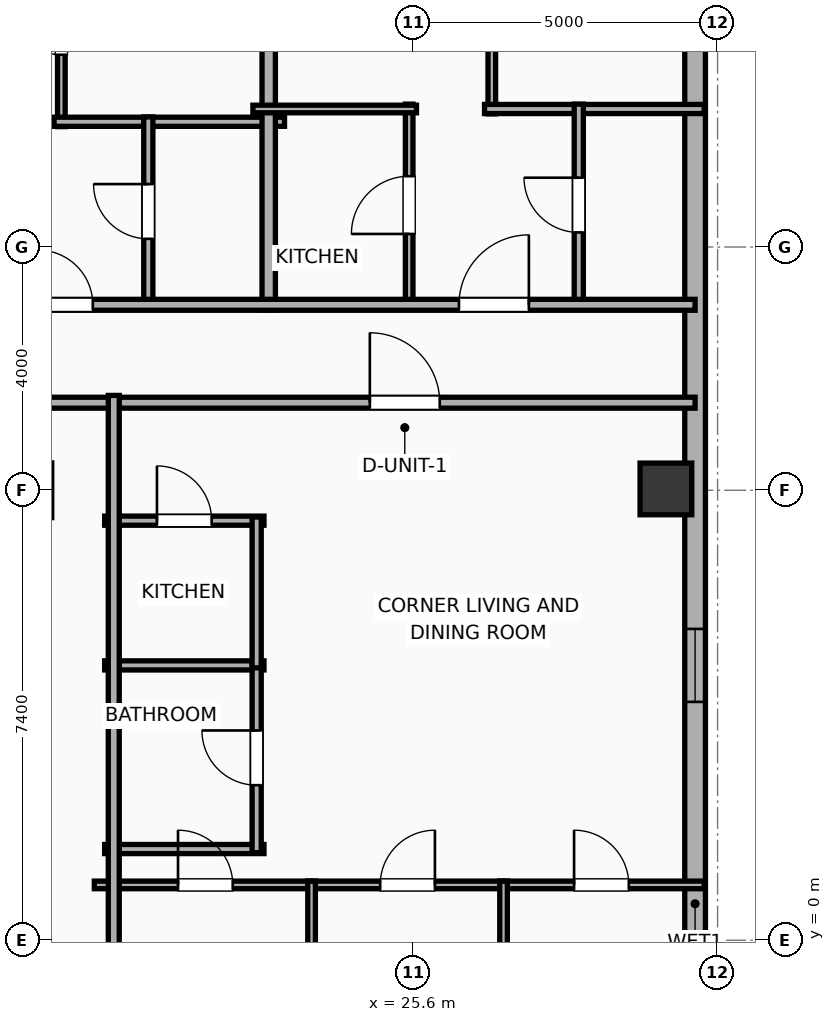
"""IFC4 building model, lengths in metres.
Left out: names, types, materials, properties, quantities, classifications, styles, units other than length and angle.
Written with IfcOpenShell. Run it as: python <this file> out.ifc"""

import sys

from ifc_helpers import new_model, si_unit, direction, frame, frame_2d, origin, origin_2d, place, context, subcontext, project, spatial, rectangle, hollow_rectangle, extrude, element, fill, save


model = new_model("IFC4")
c1 = context("Model", 3, precision=1e-05, world=origin(), true_north=direction((0.0, 1.0)))
c2 = subcontext(c1, "Body", "Model", "MODEL_VIEW")
j1 = project(units=[si_unit("LENGTHUNIT", "METRE"), si_unit("PLANEANGLEUNIT", "RADIAN")], contexts=[c1])
p1 = place(None, origin())
s1 = spatial("IfcSite", under=j1, at=p1, CompositionType="ELEMENT")
p2 = place(p1, origin())
s2 = spatial("IfcBuilding", under=s1, at=p2, CompositionType="ELEMENT")
p3 = place(p2, frame((0.0, 0.0, 204.1)))
s3 = spatial("IfcBuildingStorey", under=s2, at=p3, CompositionType="ELEMENT", Elevation=204.1)
p4 = place(p3, frame((29.75, 7.422, 0.0), z_axis=(0.0, 0.0, 1.0), x_axis=(1.0, 0.0, 0.0)))
e1 = element("IfcColumn", 1, at=p4, inside=s3, PredefinedType="COLUMN", context=c2, shape_type="SweptSolid", body=[
    extrude(hollow_rectangle(XDim=0.85, YDim=0.85, WallThickness=0.028, at=origin_2d()), origin(), (0.0, 0.0, 1.0), 3.9),
])
p5 = place(p3, frame((30.23, 16.583, 0.0), z_axis=(0.0, 0.0, 1.0), x_axis=(0.0, -1.0, 0.0)))
e2 = element("IfcWall", 2, at=p5, inside=s3, PredefinedType="ELEMENTEDWALL", context=c2, shape_type="SweptSolid", body=[
    extrude(rectangle(XDim=31.967, YDim=0.34, at=frame_2d((15.983, 0.0))), origin(), (0.0, 0.0, 1.0), 3.65),
])
p6 = place(p5, frame((29.924, 0.0, 0.75)))
e3 = element("IfcOpeningElement", 3, at=p6, cuts=e2, PredefinedType="OPENING", context=c2, shape_type="SweptSolid", body=[
    extrude(rectangle(XDim=1.2, YDim=2.05, at=frame_2d((0.6, 1.025))), frame((0.0, 0.18, 0.0), z_axis=(0.0, -1.0, 0.0), x_axis=(1.0, 0.0, 0.0)), (0.0, 0.0, 1.0), 0.36),
])
p7 = place(p5, frame((11.463, 0.0, 0.75)))
e4 = element("IfcOpeningElement", 4, at=p7, cuts=e2, PredefinedType="OPENING", context=c2, shape_type="SweptSolid", body=[
    extrude(rectangle(XDim=1.2, YDim=2.05, at=frame_2d((0.6, 1.025))), frame((0.0, 0.18, 0.0), z_axis=(0.0, -1.0, 0.0), x_axis=(1.0, 0.0, 0.0)), (0.0, 0.0, 1.0), 0.36),
])
p8 = place(p5, frame((20.363, 0.0, 0.75)))
e5 = element("IfcOpeningElement", 5, at=p8, cuts=e2, PredefinedType="OPENING", context=c2, shape_type="SweptSolid", body=[
    extrude(rectangle(XDim=1.2, YDim=2.05, at=frame_2d((0.6, 1.025))), frame((0.0, 0.18, 0.0), z_axis=(0.0, -1.0, 0.0), x_axis=(1.0, 0.0, 0.0)), (0.0, 0.0, 1.0), 0.36),
])
p9 = place(p3, frame((9.88, 8.84, 0.0), z_axis=(0.0, 0.0, 1.0), x_axis=(1.0, 0.0, 0.0)))
e6 = element("IfcWall", 6, at=p9, inside=s3, PredefinedType="PARTITIONING", context=c2, shape_type="SweptSolid", body=[
    extrude(rectangle(XDim=20.35, YDim=0.18, at=frame_2d((10.175, 0.0))), origin(), (0.0, 0.0, 1.0), 3.65),
])
p10 = place(p9, frame((15.001, 0.0, 0.0)))
e7 = element("IfcOpeningElement", 7, at=p10, cuts=e6, PredefinedType="OPENING", context=c2, shape_type="SweptSolid", body=[
    extrude(rectangle(XDim=1.15, YDim=2.05, at=frame_2d((0.575, 1.025))), frame((0.0, 0.1, 0.0), z_axis=(0.0, -1.0, 0.0), x_axis=(1.0, 0.0, 0.0)), (0.0, 0.0, 1.0), 0.2),
])
p11 = place(p3, frame((19.808, 13.38, 0.0), z_axis=(0.0, 0.0, 1.0), x_axis=(0.0, 1.0, 0.0)))
e8 = element("IfcWall", 8, at=p11, inside=s3, PredefinedType="PARTITIONING", context=c2, shape_type="SweptSolid", body=[
    extrude(rectangle(XDim=6.8, YDim=0.125, at=frame_2d((3.4, 0.0))), origin(), (0.0, 0.0, 1.0), 3.65),
])
p12 = place(p11, frame((1.182, 0.0, 0.0)))
e9 = element("IfcOpeningElement", 9, at=p12, cuts=e8, PredefinedType="OPENING", context=c2, shape_type="SweptSolid", body=[
    extrude(rectangle(XDim=0.9, YDim=2.05, at=frame_2d((0.45, 1.025))), frame((0.0, 0.073, 0.0), z_axis=(0.0, -1.0, 0.0), x_axis=(1.0, 0.0, 0.0)), (0.0, 0.0, 1.0), 0.145),
])
p13 = place(p3, frame((19.688, 13.46, 0.0), z_axis=(0.0, 0.0, 1.0), x_axis=(1.0, 0.0, 0.0)))
e10 = element("IfcWall", 10, at=p13, inside=s3, PredefinedType="PLUMBINGWALL", context=c2, shape_type="SweptSolid", body=[
    extrude(rectangle(XDim=3.79, YDim=0.15, at=frame_2d((1.895, 0.0))), origin(), (0.0, 0.0, 1.0), 3.65),
])
p14 = place(p3, frame((21.238, 10.43, 0.0), z_axis=(0.0, 0.0, 1.0), x_axis=(0.0, 1.0, 0.0)))
e11 = element("IfcWall", 11, at=p14, inside=s3, PredefinedType="PLUMBINGWALL", context=c2, shape_type="SweptSolid", body=[
    extrude(rectangle(XDim=3.11, YDim=0.15, at=frame_2d((1.555, 0.0))), origin(), (0.0, 0.0, 1.0), 3.65),
])
p15 = place(p14, frame((1.105, 0.0, 0.0)))
e12 = element("IfcOpeningElement", 12, at=p15, cuts=e11, PredefinedType="OPENING", context=c2, shape_type="SweptSolid", body=[
    extrude(rectangle(XDim=0.9, YDim=2.05, at=frame_2d((0.45, 1.025))), frame((0.0, 0.085, 0.0), z_axis=(0.0, -1.0, 0.0), x_axis=(1.0, 0.0, 0.0)), (0.0, 0.0, 1.0), 0.17),
])
p16 = place(p3, frame((23.218, 10.37, 0.0), z_axis=(0.0, 0.0, 1.0), x_axis=(0.0, 1.0, 0.0)))
e13 = element("IfcWall", 13, at=p16, inside=s3, PredefinedType="PARTITIONING", context=c2, shape_type="SweptSolid", body=[
    extrude(rectangle(XDim=9.66, YDim=0.22, at=frame_2d((4.83, 0.0))), origin(), (0.0, 0.0, 1.0), 3.65),
])
p17 = place(p3, frame((26.887, 13.59, 0.0), z_axis=(0.0, 0.0, 1.0), x_axis=(0.0, 1.0, 0.0)))
e14 = element("IfcWall", 14, at=p17, inside=s3, PredefinedType="PARTITIONING", context=c2, shape_type="SweptSolid", body=[
    extrude(rectangle(XDim=6.572, YDim=0.125, at=frame_2d((3.286, 0.0))), origin(), (0.0, 0.0, 1.0), 3.65),
])
p18 = place(p17, frame((1.127, 0.0, 0.0)))
e15 = element("IfcOpeningElement", 15, at=p18, cuts=e14, PredefinedType="OPENING", context=c2, shape_type="SweptSolid", body=[
    extrude(rectangle(XDim=0.9, YDim=2.05, at=frame_2d((0.45, 1.025))), frame((0.0, 0.073, 0.0), z_axis=(0.0, -1.0, 0.0), x_axis=(1.0, 0.0, 0.0)), (0.0, 0.0, 1.0), 0.145),
])
p19 = place(p3, frame((26.767, 13.67, 0.0), z_axis=(0.0, 0.0, 1.0), x_axis=(1.0, 0.0, 0.0)))
e16 = element("IfcWall", 16, at=p19, inside=s3, PredefinedType="PLUMBINGWALL", context=c2, shape_type="SweptSolid", body=[
    extrude(rectangle(XDim=3.613, YDim=0.15, at=frame_2d((1.806, 0.0))), origin(), (0.0, 0.0, 1.0), 3.65),
])
p20 = place(p3, frame((25.528, 10.43, 0.0), z_axis=(0.0, 0.0, 1.0), x_axis=(0.0, 1.0, 0.0)))
e17 = element("IfcWall", 17, at=p20, inside=s3, PredefinedType="PARTITIONING", context=c2, shape_type="SweptSolid", body=[
    extrude(rectangle(XDim=3.32, YDim=0.125, at=frame_2d((1.66, 0.0))), origin(), (0.0, 0.0, 1.0), 3.65),
])
p21 = place(p20, frame((1.185, 0.0, 0.0)))
e18 = element("IfcOpeningElement", 18, at=p21, cuts=e17, PredefinedType="OPENING", context=c2, shape_type="SweptSolid", body=[
    extrude(rectangle(XDim=0.95, YDim=2.05, at=frame_2d((0.475, 1.025))), frame((0.0, 0.073, 0.0), z_axis=(0.0, -1.0, 0.0), x_axis=(1.0, 0.0, 0.0)), (0.0, 0.0, 1.0), 0.145),
])
p22 = place(p3, frame((22.958, 13.67, 0.0), z_axis=(0.0, 0.0, 1.0), x_axis=(1.0, 0.0, 0.0)))
e19 = element("IfcWall", 19, at=p22, inside=s3, PredefinedType="PARTITIONING", context=c2, shape_type="SweptSolid", body=[
    extrude(rectangle(XDim=2.69, YDim=0.125, at=frame_2d((1.345, 0.0))), origin(), (0.0, 0.0, 1.0), 3.65),
])
p23 = place(p3, frame((28.317, 10.43, 0.0), z_axis=(0.0, 0.0, 1.0), x_axis=(0.0, 1.0, 0.0)))
e20 = element("IfcWall", 20, at=p23, inside=s3, PredefinedType="PLUMBINGWALL", context=c2, shape_type="SweptSolid", body=[
    extrude(rectangle(XDim=3.32, YDim=0.15, at=frame_2d((1.66, 0.0))), origin(), (0.0, 0.0, 1.0), 3.65),
])
p24 = place(p23, frame((1.21, 0.0, 0.0)))
e21 = element("IfcOpeningElement", 21, at=p24, cuts=e20, PredefinedType="OPENING", context=c2, shape_type="SweptSolid", body=[
    extrude(rectangle(XDim=0.9, YDim=2.05, at=frame_2d((0.45, 1.025))), frame((0.0, 0.085, 0.0), z_axis=(0.0, -1.0, 0.0), x_axis=(1.0, 0.0, 0.0)), (0.0, 0.0, 1.0), 0.17),
])
p25 = place(p3, frame((-26.23, 10.45, 0.0), z_axis=(0.0, 0.0, 1.0), x_axis=(1.0, 0.0, 0.0)))
e22 = element("IfcWall", 22, at=p25, inside=s3, PredefinedType="PARTITIONING", context=c2, shape_type="SweptSolid", body=[
    extrude(rectangle(XDim=56.46, YDim=0.18, at=frame_2d((28.23, 0.0))), origin(), (0.0, 0.0, 1.0), 3.65),
])
p26 = place(p25, frame((4.41, 0.0, 0.0)))
e23 = element("IfcOpeningElement", 23, at=p26, cuts=e22, PredefinedType="OPENING", context=c2, shape_type="SweptSolid", body=[
    extrude(rectangle(XDim=1.15, YDim=2.05, at=frame_2d((0.575, 1.025))), frame((0.0, 0.1, 0.0), z_axis=(0.0, -1.0, 0.0), x_axis=(1.0, 0.0, 0.0)), (0.0, 0.0, 1.0), 0.2),
])
p27 = place(p25, frame((11.943, 0.0, 0.0)))
e24 = element("IfcOpeningElement", 24, at=p27, cuts=e22, PredefinedType="OPENING", context=c2, shape_type="SweptSolid", body=[
    extrude(rectangle(XDim=0.9, YDim=2.05, at=frame_2d((0.45, 1.025))), frame((0.0, 0.1, 0.0), z_axis=(0.0, -1.0, 0.0), x_axis=(1.0, 0.0, 0.0)), (0.0, 0.0, 1.0), 0.2),
])
p28 = place(p25, frame((18.243, 0.0, 0.0)))
e25 = element("IfcOpeningElement", 25, at=p28, cuts=e22, PredefinedType="OPENING", context=c2, shape_type="SweptSolid", body=[
    extrude(rectangle(XDim=1.15, YDim=2.05, at=frame_2d((0.575, 1.025))), frame((0.0, 0.1, 0.0), z_axis=(0.0, -1.0, 0.0), x_axis=(1.0, 0.0, 0.0)), (0.0, 0.0, 1.0), 0.2),
])
p29 = place(p25, frame((22.941, 0.0, 0.0)))
e26 = element("IfcOpeningElement", 26, at=p29, cuts=e22, PredefinedType="OPENING", context=c2, shape_type="SweptSolid", body=[
    extrude(rectangle(XDim=0.9, YDim=2.05, at=frame_2d((0.45, 1.025))), frame((0.0, 0.1, 0.0), z_axis=(0.0, -1.0, 0.0), x_axis=(1.0, 0.0, 0.0)), (0.0, 0.0, 1.0), 0.2),
])
p30 = place(p25, frame((27.028, 0.0, 0.0)))
e27 = element("IfcOpeningElement", 27, at=p30, cuts=e22, PredefinedType="OPENING", context=c2, shape_type="SweptSolid", body=[
    extrude(rectangle(XDim=1.15, YDim=2.05, at=frame_2d((0.575, 1.025))), frame((0.0, 0.1, 0.0), z_axis=(0.0, -1.0, 0.0), x_axis=(1.0, 0.0, 0.0)), (0.0, 0.0, 1.0), 0.2),
])
p31 = place(p25, frame((36.864, 0.0, 0.0)))
e28 = element("IfcOpeningElement", 28, at=p31, cuts=e22, PredefinedType="OPENING", context=c2, shape_type="SweptSolid", body=[
    extrude(rectangle(XDim=1.15, YDim=2.05, at=frame_2d((0.575, 1.025))), frame((0.0, 0.1, 0.0), z_axis=(0.0, -1.0, 0.0), x_axis=(1.0, 0.0, 0.0)), (0.0, 0.0, 1.0), 0.2),
])
p32 = place(p25, frame((45.655, 0.0, 0.0)))
e29 = element("IfcOpeningElement", 29, at=p32, cuts=e22, PredefinedType="OPENING", context=c2, shape_type="SweptSolid", body=[
    extrude(rectangle(XDim=0.9, YDim=2.05, at=frame_2d((0.45, 1.025))), frame((0.0, 0.1, 0.0), z_axis=(0.0, -1.0, 0.0), x_axis=(1.0, 0.0, 0.0)), (0.0, 0.0, 1.0), 0.2),
])
p33 = place(p25, frame((52.576, 0.0, 0.0)))
e30 = element("IfcOpeningElement", 30, at=p33, cuts=e22, PredefinedType="OPENING", context=c2, shape_type="SweptSolid", body=[
    extrude(rectangle(XDim=1.15, YDim=2.05, at=frame_2d((0.575, 1.025))), frame((0.0, 0.1, 0.0), z_axis=(0.0, -1.0, 0.0), x_axis=(1.0, 0.0, 0.0)), (0.0, 0.0, 1.0), 0.2),
])
p34 = place(p3, frame((20.52, 6.9, 0.0), z_axis=(0.0, 0.0, 1.0), x_axis=(1.0, 0.0, 0.0)))
e31 = element("IfcWall", 31, at=p34, inside=s3, PredefinedType="PLUMBINGWALL", context=c2, shape_type="SweptSolid", body=[
    extrude(rectangle(XDim=2.62, YDim=0.15, at=frame_2d((1.31, 0.0))), origin(), (0.0, 0.0, 1.0), 3.65),
])
p35 = place(p34, frame((0.86, 0.0, 0.0)))
e32 = element("IfcOpeningElement", 32, at=p35, cuts=e31, PredefinedType="OPENING", context=c2, shape_type="SweptSolid", body=[
    extrude(rectangle(XDim=0.9, YDim=2.05, at=frame_2d((0.45, 1.025))), frame((0.0, 0.085, 0.0), z_axis=(0.0, -1.0, 0.0), x_axis=(1.0, 0.0, 0.0)), (0.0, 0.0, 1.0), 0.17),
])
for number, where, z_axis, x_axis in (
    (33, (20.52, 4.52, 0.0), (0.0, 0.0, 1.0), (1.0, 0.0, 0.0)),
    (34, (20.52, 1.5, 0.0), (0.0, 0.0, 1.0), (1.0, 0.0, 0.0)),
):
    element("IfcWall", number, at=place(p3, frame(where, z_axis=z_axis, x_axis=x_axis)), inside=s3, PredefinedType="PLUMBINGWALL", context=c2, shape_type="SweptSolid", body=[
        extrude(rectangle(XDim=2.62, YDim=0.15, at=frame_2d((1.31, 0.0))), origin(), (0.0, 0.0, 1.0), 3.65),
    ])
p36 = place(p3, frame((23.02, 1.44, 0.0), z_axis=(0.0, 0.0, 1.0), x_axis=(0.0, 1.0, 0.0)))
e35 = element("IfcWall", 35, at=p36, inside=s3, PredefinedType="PLUMBINGWALL", context=c2, shape_type="SweptSolid", body=[
    extrude(rectangle(XDim=3.12, YDim=0.15, at=frame_2d((1.56, 0.0))), origin(), (0.0, 0.0, 1.0), 3.65),
])
p37 = place(p36, frame((1.11, 0.0, 0.0)))
e36 = element("IfcOpeningElement", 36, at=p37, cuts=e35, PredefinedType="OPENING", context=c2, shape_type="SweptSolid", body=[
    extrude(rectangle(XDim=0.9, YDim=2.05, at=frame_2d((0.45, 1.025))), frame((0.0, 0.085, 0.0), z_axis=(0.0, -1.0, 0.0), x_axis=(1.0, 0.0, 0.0)), (0.0, 0.0, 1.0), 0.17),
])
p38 = place(p3, frame((23.02, 4.48, 0.0), z_axis=(0.0, 0.0, 1.0), x_axis=(0.0, 1.0, 0.0)))
e37 = element("IfcWall", 37, at=p38, inside=s3, PredefinedType="PLUMBINGWALL", context=c2, shape_type="SweptSolid", body=[
    extrude(rectangle(XDim=2.48, YDim=0.15, at=frame_2d((1.24, 0.0))), origin(), (0.0, 0.0, 1.0), 3.65),
])
p39 = place(p3, frame((20.35, 0.91, 0.0), z_axis=(0.0, 0.0, 1.0), x_axis=(1.0, 0.0, 0.0)))
e38 = element("IfcWall", 38, at=p39, inside=s3, PredefinedType="PARTITIONING", context=c2, shape_type="SweptSolid", body=[
    extrude(rectangle(XDim=3.635, YDim=0.125, at=frame_2d((1.818, 0.0))), origin(), (0.0, 0.0, 1.0), 3.65),
])
p40 = place(p39, frame((1.376, 0.0, 0.0)))
e39 = element("IfcOpeningElement", 39, at=p40, cuts=e38, PredefinedType="OPENING", context=c2, shape_type="SweptSolid", body=[
    extrude(rectangle(XDim=0.9, YDim=2.05, at=frame_2d((0.45, 1.025))), frame((0.0, 0.073, 0.0), z_axis=(0.0, -1.0, 0.0), x_axis=(1.0, 0.0, 0.0)), (0.0, 0.0, 1.0), 0.145),
])
p41 = place(p3, frame((23.861, 0.91, 0.0), z_axis=(0.0, 0.0, 1.0), x_axis=(1.0, 0.0, 0.0)))
e40 = element("IfcWall", 40, at=p41, inside=s3, PredefinedType="PARTITIONING", context=c2, shape_type="SweptSolid", body=[
    extrude(rectangle(XDim=3.282, YDim=0.125, at=frame_2d((1.641, 0.0))), origin(), (0.0, 0.0, 1.0), 3.65),
])
p42 = place(p41, frame((1.191, 0.0, 0.0)))
e41 = element("IfcOpeningElement", 41, at=p42, cuts=e40, PredefinedType="OPENING", context=c2, shape_type="SweptSolid", body=[
    extrude(rectangle(XDim=0.9, YDim=2.05, at=frame_2d((0.45, 1.025))), frame((0.0, 0.073, 0.0), z_axis=(0.0, -1.0, 0.0), x_axis=(1.0, 0.0, 0.0)), (0.0, 0.0, 1.0), 0.145),
])
p43 = place(p3, frame((27.018, 0.91, 0.0), z_axis=(0.0, 0.0, 1.0), x_axis=(1.0, 0.0, 0.0)))
e42 = element("IfcWall", 42, at=p43, inside=s3, PredefinedType="PARTITIONING", context=c2, shape_type="SweptSolid", body=[
    extrude(rectangle(XDim=3.362, YDim=0.125, at=frame_2d((1.681, 0.0))), origin(), (0.0, 0.0, 1.0), 3.65),
])
p44 = place(p43, frame((1.222, 0.0, 0.0)))
e43 = element("IfcOpeningElement", 43, at=p44, cuts=e42, PredefinedType="OPENING", context=c2, shape_type="SweptSolid", body=[
    extrude(rectangle(XDim=0.9, YDim=2.05, at=frame_2d((0.45, 1.025))), frame((0.0, 0.073, 0.0), z_axis=(0.0, -1.0, 0.0), x_axis=(1.0, 0.0, 0.0)), (0.0, 0.0, 1.0), 0.145),
])
for number, where, z_axis, x_axis in (
    (44, (27.08, -9.16, 0.0), (0.0, 0.0, 1.0), (0.0, 1.0, 0.0)),
    (45, (23.923, -9.16, 0.0), (0.0, 0.0, 1.0), (0.0, 1.0, 0.0)),
):
    element("IfcWall", number, at=place(p3, frame(where, z_axis=z_axis, x_axis=x_axis)), inside=s3, PredefinedType="PARTITIONING", context=c2, shape_type="SweptSolid", body=[
        extrude(rectangle(XDim=10.13, YDim=0.125, at=frame_2d((5.065, 0.0))), origin(), (0.0, 0.0, 1.0), 3.65),
    ])
p45 = place(p3, frame((20.67, -8.96, 0.0), z_axis=(0.0, 0.0, 1.0), x_axis=(0.0, 1.0, 0.0)))
e46 = element("IfcWall", 46, at=p45, inside=s3, PredefinedType="PARTITIONING", context=c2, shape_type="SweptSolid", body=[
    extrude(rectangle(XDim=17.92, YDim=0.18, at=frame_2d((8.96, 0.0))), origin(), (0.0, 0.0, 1.0), 3.65),
])
p46 = place(p7, origin())
e47 = element("IfcWindow", 47, at=p46, inside=s3, PartitioningType="SINGLE_PANEL", PredefinedType="WINDOW", context=c2, shape_type="SweptSolid", body=[
    extrude(rectangle(XDim=1.2, YDim=2.05, at=frame_2d((0.6, 1.025))), frame((0.0, 0.03, 0.0), z_axis=(0.0, -1.0, 0.0), x_axis=(1.0, 0.0, 0.0)), (0.0, 0.0, 1.0), 0.06),
])
fill(e4, e47)
p47 = place(p10, origin())
e48 = element("IfcDoor", 48, at=p47, inside=s3, OperationType="SINGLE_SWING_LEFT", PredefinedType="DOOR", context=c2, shape_type="SweptSolid", body=[
    extrude(rectangle(XDim=1.15, YDim=2.05, at=frame_2d((0.575, 1.025))), frame((0.0, 0.025, 0.0), z_axis=(0.0, -1.0, 0.0), x_axis=(1.0, 0.0, 0.0)), (0.0, 0.0, 1.0), 0.05),
])
fill(e7, e48)
p48 = place(p12, origin())
e49 = element("IfcDoor", 49, at=p48, inside=s3, OperationType="SINGLE_SWING_RIGHT", PredefinedType="DOOR", context=c2, shape_type="SweptSolid", body=[
    extrude(rectangle(XDim=0.9, YDim=2.05, at=frame_2d((0.45, 1.025))), frame((0.0, 0.025, 0.0), z_axis=(0.0, -1.0, 0.0), x_axis=(1.0, 0.0, 0.0)), (0.0, 0.0, 1.0), 0.05),
])
fill(e9, e49)
p49 = place(p15, origin())
e50 = element("IfcDoor", 50, at=p49, inside=s3, OperationType="SINGLE_SWING_RIGHT", PredefinedType="DOOR", context=c2, shape_type="SweptSolid", body=[
    extrude(rectangle(XDim=0.9, YDim=2.05, at=frame_2d((0.45, 1.025))), frame((0.0, 0.025, 0.0), z_axis=(0.0, -1.0, 0.0), x_axis=(1.0, 0.0, 0.0)), (0.0, 0.0, 1.0), 0.05),
])
fill(e12, e50)
p50 = place(p21, origin())
e51 = element("IfcDoor", 51, at=p50, inside=s3, OperationType="SINGLE_SWING_LEFT", PredefinedType="DOOR", context=c2, shape_type="SweptSolid", body=[
    extrude(rectangle(XDim=0.95, YDim=2.05, at=frame_2d((0.475, 1.025))), frame((0.0, 0.025, 0.0), z_axis=(0.0, -1.0, 0.0), x_axis=(1.0, 0.0, 0.0)), (0.0, 0.0, 1.0), 0.05),
])
fill(e18, e51)
p51 = place(p24, origin())
e52 = element("IfcDoor", 52, at=p51, inside=s3, OperationType="SINGLE_SWING_RIGHT", PredefinedType="DOOR", context=c2, shape_type="SweptSolid", body=[
    extrude(rectangle(XDim=0.9, YDim=2.05, at=frame_2d((0.45, 1.025))), frame((0.0, 0.025, 0.0), z_axis=(0.0, -1.0, 0.0), x_axis=(1.0, 0.0, 0.0)), (0.0, 0.0, 1.0), 0.05),
])
fill(e21, e52)
p52 = place(p32, origin())
e53 = element("IfcDoor", 53, at=p52, inside=s3, OperationType="SINGLE_SWING_LEFT", PredefinedType="DOOR", context=c2, shape_type="SweptSolid", body=[
    extrude(rectangle(XDim=0.9, YDim=2.05, at=frame_2d((0.45, 1.025))), frame((0.0, 0.025, 0.0), z_axis=(0.0, -1.0, 0.0), x_axis=(1.0, 0.0, 0.0)), (0.0, 0.0, 1.0), 0.05),
])
fill(e29, e53)
p53 = place(p33, origin())
e54 = element("IfcDoor", 54, at=p53, inside=s3, OperationType="SINGLE_SWING_RIGHT", PredefinedType="DOOR", context=c2, shape_type="SweptSolid", body=[
    extrude(rectangle(XDim=1.15, YDim=2.05, at=frame_2d((0.575, 1.025))), frame((0.0, 0.025, 0.0), z_axis=(0.0, -1.0, 0.0), x_axis=(1.0, 0.0, 0.0)), (0.0, 0.0, 1.0), 0.05),
])
fill(e30, e54)
p54 = place(p35, origin())
e55 = element("IfcDoor", 55, at=p54, inside=s3, OperationType="SINGLE_SWING_LEFT", PredefinedType="DOOR", context=c2, shape_type="SweptSolid", body=[
    extrude(rectangle(XDim=0.9, YDim=2.05, at=frame_2d((0.45, 1.025))), frame((0.0, 0.025, 0.0), z_axis=(0.0, -1.0, 0.0), x_axis=(1.0, 0.0, 0.0)), (0.0, 0.0, 1.0), 0.05),
])
fill(e32, e55)
p55 = place(p37, origin())
e56 = element("IfcDoor", 56, at=p55, inside=s3, OperationType="SINGLE_SWING_RIGHT", PredefinedType="DOOR", context=c2, shape_type="SweptSolid", body=[
    extrude(rectangle(XDim=0.9, YDim=2.05, at=frame_2d((0.45, 1.025))), frame((0.0, 0.025, 0.0), z_axis=(0.0, -1.0, 0.0), x_axis=(1.0, 0.0, 0.0)), (0.0, 0.0, 1.0), 0.05),
])
fill(e36, e56)
p56 = place(p40, origin())
e57 = element("IfcDoor", 57, at=p56, inside=s3, OperationType="SINGLE_SWING_LEFT", PredefinedType="DOOR", context=c2, shape_type="SweptSolid", body=[
    extrude(rectangle(XDim=0.9, YDim=2.05, at=frame_2d((0.45, 1.025))), frame((0.0, 0.025, 0.0), z_axis=(0.0, -1.0, 0.0), x_axis=(1.0, 0.0, 0.0)), (0.0, 0.0, 1.0), 0.05),
])
fill(e39, e57)
p57 = place(p42, origin())
e58 = element("IfcDoor", 58, at=p57, inside=s3, OperationType="SINGLE_SWING_RIGHT", PredefinedType="DOOR", context=c2, shape_type="SweptSolid", body=[
    extrude(rectangle(XDim=0.9, YDim=2.05, at=frame_2d((0.45, 1.025))), frame((0.0, 0.025, 0.0), z_axis=(0.0, -1.0, 0.0), x_axis=(1.0, 0.0, 0.0)), (0.0, 0.0, 1.0), 0.05),
])
fill(e41, e58)
p58 = place(p44, origin())
e59 = element("IfcDoor", 59, at=p58, inside=s3, OperationType="SINGLE_SWING_LEFT", PredefinedType="DOOR", context=c2, shape_type="SweptSolid", body=[
    extrude(rectangle(XDim=0.9, YDim=2.05, at=frame_2d((0.45, 1.025))), frame((0.0, 0.025, 0.0), z_axis=(0.0, -1.0, 0.0), x_axis=(1.0, 0.0, 0.0)), (0.0, 0.0, 1.0), 0.05),
])
fill(e43, e59)
save(model, sys.argv[1])
